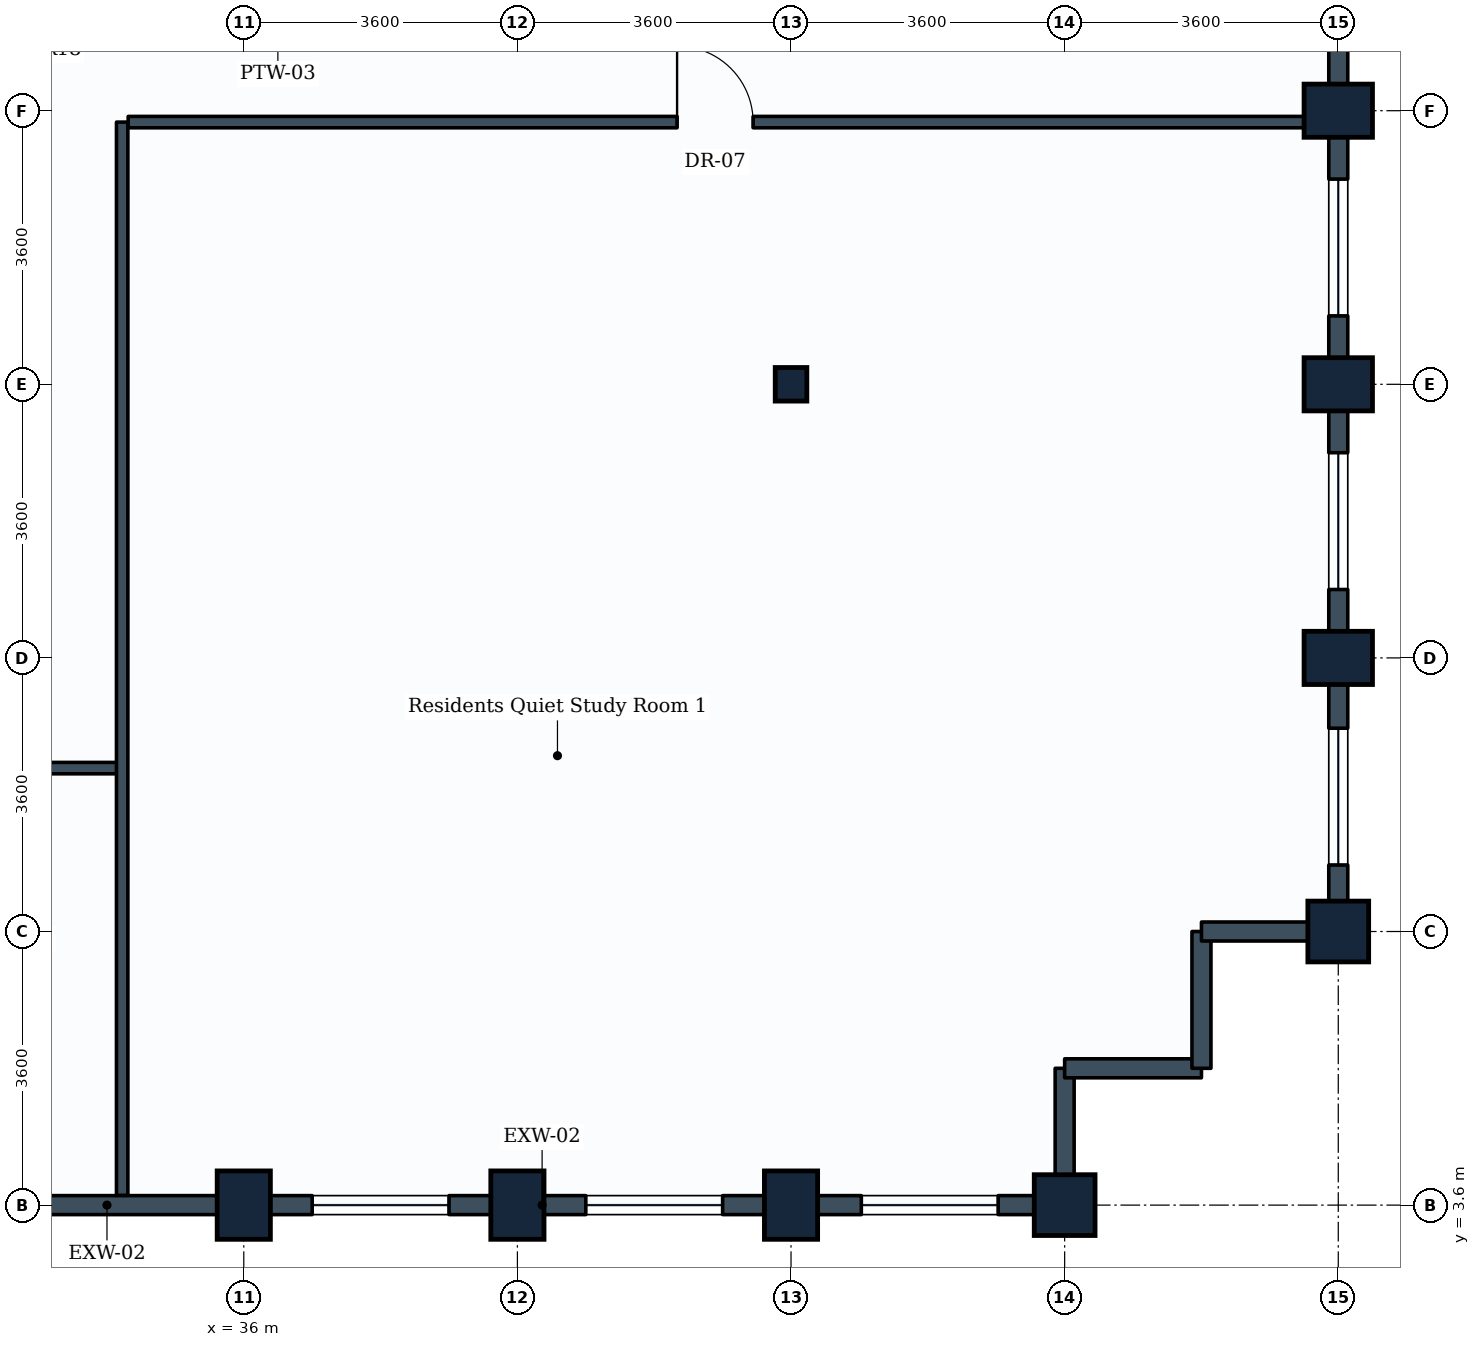
"""IFC4 building model, lengths in metres.
Left out: names, types, materials, properties, quantities, classifications, styles, units other than length and angle.
Written with IfcOpenShell. Run it as: python <this file> out.ifc"""

import sys

from ifc_helpers import new_model, si_unit, direction, frame, frame_2d, origin, origin_2d, place, context, subcontext, project, spatial, rectangle, i_section, extrude, element, fill, save


model = new_model("IFC4")
c1 = context("Model", 3, precision=1e-05, world=origin(), true_north=direction((0.0, 1.0)))
c2 = subcontext(c1, "Body", "Model", "MODEL_VIEW")
j1 = project(units=[si_unit("LENGTHUNIT", "METRE"), si_unit("PLANEANGLEUNIT", "RADIAN")], contexts=[c1])
p1 = place(None, origin())
s1 = spatial("IfcSite", under=j1, at=p1, CompositionType="ELEMENT")
p2 = place(p1, origin())
s2 = spatial("IfcBuilding", under=s1, at=p2, CompositionType="ELEMENT")
p3 = place(p2, frame((0.0, 0.0, 197.6)))
s3 = spatial("IfcBuildingStorey", under=s2, at=p3, CompositionType="ELEMENT", Elevation=197.6)
for number, where, z_axis, x_axis in (
    (1, (36.0, 3.6, 0.0), (0.0, 0.0, 1.0), (1.0, 0.0, 0.0)),
    (2, (39.6, 3.6, 0.0), (0.0, 0.0, 1.0), (1.0, 0.0, 0.0)),
    (3, (43.2, 3.6, 0.0), (0.0, 0.0, 1.0), (1.0, 0.0, 0.0)),
):
    element("IfcColumn", number, at=place(p3, frame(where, z_axis=z_axis, x_axis=x_axis)), inside=s3, PredefinedType="COLUMN", context=c2, shape_type="SweptSolid", body=[
        extrude(rectangle(XDim=0.7, YDim=0.9, at=origin_2d()), origin(), (0.0, 0.0, 1.0), 3.8),
    ])
p4 = place(p3, frame((43.2, 14.4, 0.0), z_axis=(0.0, 0.0, 1.0), x_axis=(1.0, 0.0, 0.0)))
e4 = element("IfcColumn", 4, at=p4, inside=s3, PredefinedType="COLUMN", context=c2, shape_type="SweptSolid", body=[
    extrude(i_section(OverallWidth=0.416, OverallDepth=0.442, WebThickness=0.025, FlangeThickness=0.041, FilletRadius=0.015, at=origin_2d()), origin(), (0.0, 0.0, 1.0), 3.8),
])
for number, where, z_axis, x_axis in (
    (5, (46.8, 3.6, 0.0), (0.0, 0.0, 1.0), (1.0, 0.0, 0.0)),
    (6, (50.4, 7.2, 0.0), (0.0, 0.0, 1.0), (1.0, 0.0, 0.0)),
):
    element("IfcColumn", number, at=place(p3, frame(where, z_axis=z_axis, x_axis=x_axis)), inside=s3, PredefinedType="COLUMN", context=c2, shape_type="SweptSolid", body=[
        extrude(rectangle(XDim=0.8, YDim=0.8, at=origin_2d()), origin(), (0.0, 0.0, 1.0), 3.8),
    ])
for number, where, z_axis, x_axis in (
    (7, (50.4, 10.8, 0.0), (0.0, 0.0, 1.0), (0.0, 1.0, 0.0)),
    (8, (50.4, 14.4, 0.0), (0.0, 0.0, 1.0), (0.0, 1.0, 0.0)),
    (9, (50.4, 18.0, 0.0), (0.0, 0.0, 1.0), (0.0, 1.0, 0.0)),
):
    element("IfcColumn", number, at=place(p3, frame(where, z_axis=z_axis, x_axis=x_axis)), inside=s3, PredefinedType="COLUMN", context=c2, shape_type="SweptSolid", body=[
        extrude(rectangle(XDim=0.7, YDim=0.9, at=origin_2d()), origin(), (0.0, 0.0, 1.0), 3.8),
    ])
p5 = place(p3, frame((36.0, 3.6, 0.0), z_axis=(0.0, 0.0, 1.0), x_axis=(-1.0, 0.0, 0.0)))
e10 = element("IfcWall", 10, at=p5, inside=s3, PredefinedType="STANDARD", context=c2, shape_type="SweptSolid", body=[
    extrude(rectangle(XDim=3.6, YDim=0.25, at=frame_2d((1.8, 0.0))), origin(), (0.0, 0.0, 1.0), 2.93),
])
p6 = place(p3, frame((39.6, 3.6, 0.0), z_axis=(0.0, 0.0, 1.0), x_axis=(-1.0, 0.0, 0.0)))
e11 = element("IfcWall", 11, at=p6, inside=s3, PredefinedType="STANDARD", context=c2, shape_type="SweptSolid", body=[
    extrude(rectangle(XDim=3.6, YDim=0.25, at=frame_2d((1.8, 0.0))), origin(), (0.0, 0.0, 1.0), 2.93),
])
p7 = place(p6, frame((0.9, 0.0, 0.85)))
e12 = element("IfcOpeningElement", 12, at=p7, cuts=e11, PredefinedType="OPENING", context=c2, shape_type="SweptSolid", body=[
    extrude(rectangle(XDim=1.8, YDim=1.35, at=frame_2d((0.9, 0.675))), frame((0.0, 0.135, 0.0), z_axis=(0.0, -1.0, 0.0), x_axis=(1.0, 0.0, 0.0)), (0.0, 0.0, 1.0), 0.27),
])
p8 = place(p3, frame((43.2, 3.6, 0.0), z_axis=(0.0, 0.0, 1.0), x_axis=(-1.0, 0.0, 0.0)))
e13 = element("IfcWall", 13, at=p8, inside=s3, PredefinedType="STANDARD", context=c2, shape_type="SweptSolid", body=[
    extrude(rectangle(XDim=3.6, YDim=0.25, at=frame_2d((1.8, 0.0))), origin(), (0.0, 0.0, 1.0), 2.93),
])
p9 = place(p8, frame((0.9, 0.0, 0.85)))
e14 = element("IfcOpeningElement", 14, at=p9, cuts=e13, PredefinedType="OPENING", context=c2, shape_type="SweptSolid", body=[
    extrude(rectangle(XDim=1.8, YDim=1.35, at=frame_2d((0.9, 0.675))), frame((0.0, 0.135, 0.0), z_axis=(0.0, -1.0, 0.0), x_axis=(1.0, 0.0, 0.0)), (0.0, 0.0, 1.0), 0.27),
])
p10 = place(p3, frame((46.8, 3.6, 0.0), z_axis=(0.0, 0.0, 1.0), x_axis=(-1.0, 0.0, 0.0)))
e15 = element("IfcWall", 15, at=p10, inside=s3, PredefinedType="STANDARD", context=c2, shape_type="SweptSolid", body=[
    extrude(rectangle(XDim=3.6, YDim=0.25, at=frame_2d((1.8, 0.0))), origin(), (0.0, 0.0, 1.0), 2.93),
])
p11 = place(p10, frame((0.875, 0.0, 0.85)))
e16 = element("IfcOpeningElement", 16, at=p11, cuts=e15, PredefinedType="OPENING", context=c2, shape_type="SweptSolid", body=[
    extrude(rectangle(XDim=1.8, YDim=1.35, at=frame_2d((0.9, 0.675))), frame((0.0, 0.135, 0.0), z_axis=(0.0, -1.0, 0.0), x_axis=(1.0, 0.0, 0.0)), (0.0, 0.0, 1.0), 0.27),
])
p12 = place(p3, frame((46.8, 5.4, 0.0), z_axis=(0.0, 0.0, 1.0), x_axis=(0.0, -1.0, 0.0)))
e17 = element("IfcWall", 17, at=p12, inside=s3, PredefinedType="STANDARD", context=c2, shape_type="SweptSolid", body=[
    extrude(rectangle(XDim=1.8, YDim=0.25, at=frame_2d((0.9, 0.0))), origin(), (0.0, 0.0, 1.0), 2.93),
])
for number, where, z_axis, x_axis in (
    (18, (48.6, 5.4, 0.0), (0.0, 0.0, 1.0), (-1.0, 0.0, 0.0)),
    (19, (48.6, 7.2, 0.0), (0.0, 0.0, 1.0), (0.0, -1.0, 0.0)),
):
    element("IfcWall", number, at=place(p3, frame(where, z_axis=z_axis, x_axis=x_axis)), inside=s3, PredefinedType="STANDARD", context=c2, shape_type="SweptSolid", body=[
        extrude(rectangle(XDim=1.8, YDim=0.25, at=frame_2d((0.9, 0.0))), origin(), (0.0, 0.0, 1.0), 3.535),
    ])
p13 = place(p3, frame((50.4, 7.2, 0.0), z_axis=(0.0, 0.0, 1.0), x_axis=(-1.0, 0.0, 0.0)))
e20 = element("IfcWall", 20, at=p13, inside=s3, PredefinedType="STANDARD", context=c2, shape_type="SweptSolid", body=[
    extrude(rectangle(XDim=1.8, YDim=0.25, at=frame_2d((0.9, 0.0))), origin(), (0.0, 0.0, 1.0), 2.93),
])
p14 = place(p3, frame((50.4, 10.8, 0.0), z_axis=(0.0, 0.0, 1.0), x_axis=(0.0, -1.0, 0.0)))
e21 = element("IfcWall", 21, at=p14, inside=s3, PredefinedType="STANDARD", context=c2, shape_type="SweptSolid", body=[
    extrude(rectangle(XDim=3.6, YDim=0.25, at=frame_2d((1.8, 0.0))), origin(), (0.0, 0.0, 1.0), 2.93),
])
p15 = place(p14, frame((0.925, 0.0, 0.85)))
e22 = element("IfcOpeningElement", 22, at=p15, cuts=e21, PredefinedType="OPENING", context=c2, shape_type="SweptSolid", body=[
    extrude(rectangle(XDim=1.8, YDim=1.35, at=frame_2d((0.9, 0.675))), frame((0.0, 0.135, 0.0), z_axis=(0.0, -1.0, 0.0), x_axis=(1.0, 0.0, 0.0)), (0.0, 0.0, 1.0), 0.27),
])
p16 = place(p3, frame((50.4, 14.4, 0.0), z_axis=(0.0, 0.0, 1.0), x_axis=(0.0, -1.0, 0.0)))
e23 = element("IfcWall", 23, at=p16, inside=s3, PredefinedType="STANDARD", context=c2, shape_type="SweptSolid", body=[
    extrude(rectangle(XDim=3.6, YDim=0.25, at=frame_2d((1.8, 0.0))), origin(), (0.0, 0.0, 1.0), 2.93),
])
p17 = place(p16, frame((0.9, 0.0, 0.85)))
e24 = element("IfcOpeningElement", 24, at=p17, cuts=e23, PredefinedType="OPENING", context=c2, shape_type="SweptSolid", body=[
    extrude(rectangle(XDim=1.8, YDim=1.35, at=frame_2d((0.9, 0.675))), frame((0.0, 0.135, 0.0), z_axis=(0.0, -1.0, 0.0), x_axis=(1.0, 0.0, 0.0)), (0.0, 0.0, 1.0), 0.27),
])
p18 = place(p3, frame((50.4, 18.0, 0.0), z_axis=(0.0, 0.0, 1.0), x_axis=(0.0, -1.0, 0.0)))
e25 = element("IfcWall", 25, at=p18, inside=s3, PredefinedType="STANDARD", context=c2, shape_type="SweptSolid", body=[
    extrude(rectangle(XDim=3.6, YDim=0.25, at=frame_2d((1.8, 0.0))), origin(), (0.0, 0.0, 1.0), 2.93),
])
p19 = place(p18, frame((0.9, 0.0, 0.85)))
e26 = element("IfcOpeningElement", 26, at=p19, cuts=e25, PredefinedType="OPENING", context=c2, shape_type="SweptSolid", body=[
    extrude(rectangle(XDim=1.8, YDim=1.35, at=frame_2d((0.9, 0.675))), frame((0.0, 0.135, 0.0), z_axis=(0.0, -1.0, 0.0), x_axis=(1.0, 0.0, 0.0)), (0.0, 0.0, 1.0), 0.27),
])
p20 = place(p3, frame((50.4, 21.6, 0.0), z_axis=(0.0, 0.0, 1.0), x_axis=(0.0, -1.0, 0.0)))
e27 = element("IfcWall", 27, at=p20, inside=s3, PredefinedType="STANDARD", context=c2, shape_type="SweptSolid", body=[
    extrude(rectangle(XDim=3.6, YDim=0.25, at=frame_2d((1.8, 0.0))), origin(), (0.0, 0.0, 1.0), 2.93),
])
p21 = place(p3, frame((28.879, 9.35, 0.0), z_axis=(0.0, 0.0, 1.0), x_axis=(1.0, 0.0, 0.0)))
e28 = element("IfcWall", 28, at=p21, inside=s3, PredefinedType="PARTITIONING", context=c2, shape_type="SweptSolid", body=[
    extrude(rectangle(XDim=5.521, YDim=0.15, at=frame_2d((2.76, 0.0))), origin(), (0.0, 0.0, 1.0), 3.535),
])
p22 = place(p21, frame((0.36, 0.0, 0.0)))
e29 = element("IfcOpeningElement", 29, at=p22, cuts=e28, PredefinedType="OPENING", context=c2, shape_type="SweptSolid", body=[
    extrude(rectangle(XDim=1.0, YDim=2.1, at=frame_2d((0.5, 1.05))), frame((0.0, 0.085, 0.0), z_axis=(0.0, -1.0, 0.0), x_axis=(1.0, 0.0, 0.0)), (0.0, 0.0, 1.0), 0.17),
])
p23 = place(p3, frame((34.4, 3.729, 0.0), z_axis=(0.0, 0.0, 1.0), x_axis=(0.0, 1.0, 0.0)))
e30 = element("IfcWall", 30, at=p23, inside=s3, PredefinedType="PARTITIONING", context=c2, shape_type="SweptSolid", body=[
    extrude(rectangle(XDim=14.121, YDim=0.15, at=frame_2d((7.061, 0.0))), origin(), (0.0, 0.0, 1.0), 2.93),
])
p24 = place(p3, frame((34.479, 17.85, 0.0), z_axis=(0.0, 0.0, 1.0), x_axis=(1.0, 0.0, 0.0)))
e31 = element("IfcWall", 31, at=p24, inside=s3, PredefinedType="PARTITIONING", context=c2, shape_type="SweptSolid", body=[
    extrude(rectangle(XDim=15.792, YDim=0.15, at=frame_2d((7.896, 0.0))), origin(), (0.0, 0.0, 1.0), 2.93),
])
p25 = place(p24, frame((7.222, 0.0, 0.0)))
e32 = element("IfcOpeningElement", 32, at=p25, cuts=e31, PredefinedType="OPENING", context=c2, shape_type="SweptSolid", body=[
    extrude(rectangle(XDim=1.0, YDim=2.1, at=frame_2d((0.5, 1.05))), frame((0.0, 0.085, 0.0), z_axis=(0.0, -1.0, 0.0), x_axis=(1.0, 0.0, 0.0)), (0.0, 0.0, 1.0), 0.17),
])
p26 = place(p7, origin())
e33 = element("IfcWindow", 33, at=p26, inside=s3, PartitioningType="SINGLE_PANEL", PredefinedType="WINDOW", context=c2, shape_type="SweptSolid", body=[
    extrude(rectangle(XDim=1.8, YDim=1.35, at=frame_2d((0.9, 0.675))), frame((0.0, 0.03, 0.0), z_axis=(0.0, -1.0, 0.0), x_axis=(1.0, 0.0, 0.0)), (0.0, 0.0, 1.0), 0.06),
])
fill(e12, e33)
p27 = place(p9, origin())
e34 = element("IfcWindow", 34, at=p27, inside=s3, PartitioningType="SINGLE_PANEL", PredefinedType="WINDOW", context=c2, shape_type="SweptSolid", body=[
    extrude(rectangle(XDim=1.8, YDim=1.35, at=frame_2d((0.9, 0.675))), frame((0.0, 0.03, 0.0), z_axis=(0.0, -1.0, 0.0), x_axis=(1.0, 0.0, 0.0)), (0.0, 0.0, 1.0), 0.06),
])
fill(e14, e34)
p28 = place(p11, origin())
e35 = element("IfcWindow", 35, at=p28, inside=s3, PartitioningType="SINGLE_PANEL", PredefinedType="WINDOW", context=c2, shape_type="SweptSolid", body=[
    extrude(rectangle(XDim=1.8, YDim=1.35, at=frame_2d((0.9, 0.675))), frame((0.0, 0.03, 0.0), z_axis=(0.0, -1.0, 0.0), x_axis=(1.0, 0.0, 0.0)), (0.0, 0.0, 1.0), 0.06),
])
fill(e16, e35)
p29 = place(p15, origin())
e36 = element("IfcWindow", 36, at=p29, inside=s3, PartitioningType="SINGLE_PANEL", PredefinedType="WINDOW", context=c2, shape_type="SweptSolid", body=[
    extrude(rectangle(XDim=1.8, YDim=1.35, at=frame_2d((0.9, 0.675))), frame((0.0, 0.03, 0.0), z_axis=(0.0, -1.0, 0.0), x_axis=(1.0, 0.0, 0.0)), (0.0, 0.0, 1.0), 0.06),
])
fill(e22, e36)
p30 = place(p17, origin())
e37 = element("IfcWindow", 37, at=p30, inside=s3, PartitioningType="SINGLE_PANEL", PredefinedType="WINDOW", context=c2, shape_type="SweptSolid", body=[
    extrude(rectangle(XDim=1.8, YDim=1.35, at=frame_2d((0.9, 0.675))), frame((0.0, 0.03, 0.0), z_axis=(0.0, -1.0, 0.0), x_axis=(1.0, 0.0, 0.0)), (0.0, 0.0, 1.0), 0.06),
])
fill(e24, e37)
p31 = place(p19, origin())
e38 = element("IfcWindow", 38, at=p31, inside=s3, PartitioningType="SINGLE_PANEL", PredefinedType="WINDOW", context=c2, shape_type="SweptSolid", body=[
    extrude(rectangle(XDim=1.8, YDim=1.35, at=frame_2d((0.9, 0.675))), frame((0.0, 0.03, 0.0), z_axis=(0.0, -1.0, 0.0), x_axis=(1.0, 0.0, 0.0)), (0.0, 0.0, 1.0), 0.06),
])
fill(e26, e38)
p32 = place(p25, origin())
e39 = element("IfcDoor", 39, at=p32, inside=s3, OperationType="SINGLE_SWING_LEFT", PredefinedType="DOOR", context=c2, shape_type="SweptSolid", body=[
    extrude(rectangle(XDim=1.0, YDim=2.1, at=frame_2d((0.5, 1.05))), frame((0.0, 0.025, 0.0), z_axis=(0.0, -1.0, 0.0), x_axis=(1.0, 0.0, 0.0)), (0.0, 0.0, 1.0), 0.05),
])
fill(e32, e39)
save(model, sys.argv[1])
